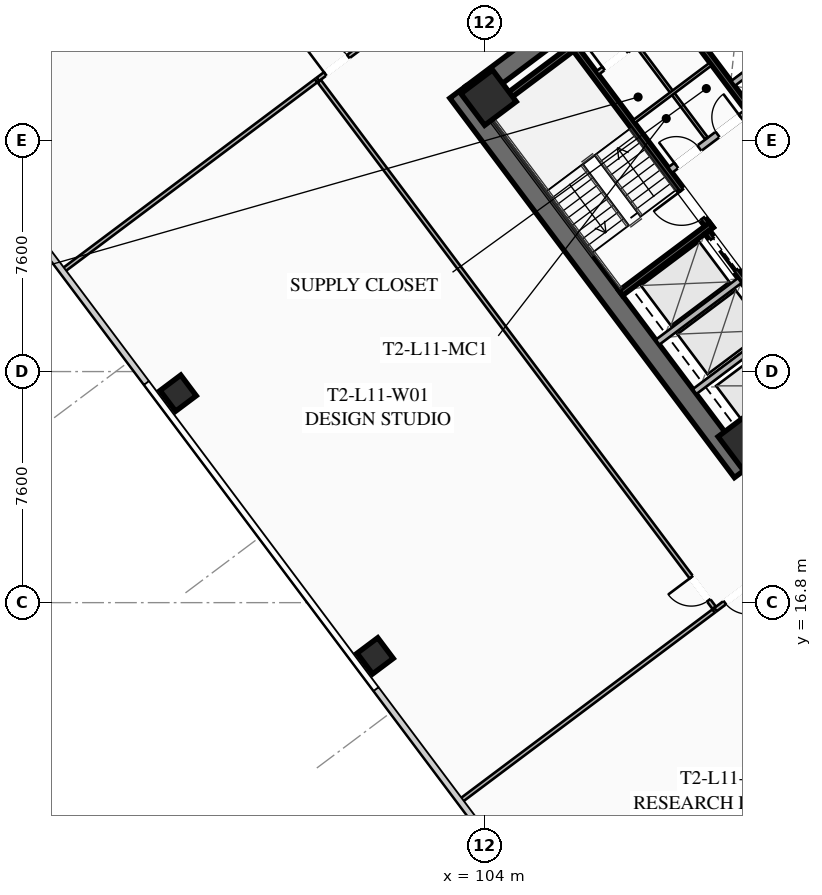
"""IFC4 building model, lengths in metres.
Left out: names, types, materials, properties, quantities, classifications, styles, units other than length and angle.
Written with IfcOpenShell. Run it as: python <this file> out.ifc"""

import sys

from ifc_helpers import new_model, si_unit, direction, frame, frame_2d, origin, origin_2d, place, context, subcontext, project, spatial, rectangle, hollow_rectangle, extrude, element, fill, save


model = new_model("IFC4")
c1 = context("Model", 3, precision=1e-05, world=origin(), true_north=direction((0.0, 1.0)))
c2 = subcontext(c1, "Body", "Model", "MODEL_VIEW")
j1 = project(units=[si_unit("LENGTHUNIT", "METRE"), si_unit("PLANEANGLEUNIT", "RADIAN")], contexts=[c1])
p1 = place(None, origin())
s1 = spatial("IfcSite", under=j1, at=p1, CompositionType="ELEMENT")
p2 = place(p1, origin())
s2 = spatial("IfcBuilding", under=s1, at=p2, CompositionType="ELEMENT")
p3 = place(p2, frame((0.0, 0.0, 45.9)))
s3 = spatial("IfcBuildingStorey", under=s2, at=p3, CompositionType="ELEMENT", Elevation=45.9)
p4 = place(p3, frame((112.476, 21.107, 0.0), z_axis=(0.0, 0.0, 1.0), x_axis=(-0.600005007985, 0.799996243986, 0.0)))
e1 = element("IfcWall", 1, at=p4, inside=s3, PredefinedType="SHEAR", context=c2, shape_type="SweptSolid", body=[
    extrude(rectangle(XDim=15.6, YDim=0.65, at=frame_2d((7.8, 0.0))), origin(), (0.0, 0.0, 1.0), 3.55),
])
p5 = place(p3, frame((124.429, 30.478, 0.0), z_axis=(0.0, 0.0, 1.0), x_axis=(-0.799998028465, -0.600002628705, 0.0)))
e2 = element("IfcWall", 2, at=p5, inside=s3, PredefinedType="SHEAR", context=c2, shape_type="SweptSolid", body=[
    extrude(rectangle(XDim=14.86, YDim=0.65, at=frame_2d((7.43, 0.0))), origin(), (0.0, 0.0, 1.0), 3.55),
])
p6 = place(p5, frame((9.13, 0.0, 0.0)))
e3 = element("IfcOpeningElement", 3, at=p6, cuts=e2, PredefinedType="OPENING", context=c2, shape_type="SweptSolid", body=[
    extrude(rectangle(XDim=1.25, YDim=2.25, at=frame_2d((0.625, 1.125))), frame((0.0, 0.335, 0.0), z_axis=(0.0, -1.0, 0.0), x_axis=(1.0, 0.0, 0.0)), (0.0, 0.0, 1.0), 0.67),
])
p7 = place(p5, frame((4.08, 0.0, 0.0)))
e4 = element("IfcOpeningElement", 4, at=p7, cuts=e2, PredefinedType="OPENING", context=c2, shape_type="SweptSolid", body=[
    extrude(rectangle(XDim=1.25, YDim=2.25, at=frame_2d((0.625, 1.125))), frame((0.0, 0.335, 0.0), z_axis=(0.0, -1.0, 0.0), x_axis=(1.0, 0.0, 0.0)), (0.0, 0.0, 1.0), 0.67),
])
p8 = place(p3, frame((103.571, 33.522, 0.0), z_axis=(0.0, 0.0, 1.0), x_axis=(0.799998028465, 0.600002628705, 0.0)))
e5 = element("IfcWall", 5, at=p8, inside=s3, PredefinedType="SHEAR", context=c2, shape_type="SweptSolid", body=[
    extrude(rectangle(XDim=14.86, YDim=0.65, at=frame_2d((7.43, 0.0))), origin(), (0.0, 0.0, 1.0), 3.55),
])
p9 = place(p8, frame((4.48, 0.0, 0.0)))
e6 = element("IfcOpeningElement", 6, at=p9, cuts=e5, PredefinedType="OPENING", context=c2, shape_type="SweptSolid", body=[
    extrude(rectangle(XDim=1.25, YDim=2.25, at=frame_2d((0.625, 1.125))), frame((0.0, 0.335, 0.0), z_axis=(0.0, -1.0, 0.0), x_axis=(1.0, 0.0, 0.0)), (0.0, 0.0, 1.0), 0.67),
])
p10 = place(p8, frame((9.53, 0.0, 0.0)))
e7 = element("IfcOpeningElement", 7, at=p10, cuts=e5, PredefinedType="OPENING", context=c2, shape_type="SweptSolid", body=[
    extrude(rectangle(XDim=1.25, YDim=2.25, at=frame_2d((0.625, 1.125))), frame((0.0, 0.335, 0.0), z_axis=(0.0, -1.0, 0.0), x_axis=(1.0, 0.0, 0.0)), (0.0, 0.0, 1.0), 0.67),
])
for number, where, z_axis, x_axis in (
    (8, (112.59, 22.13, 0.0), (0.0, 0.0, 1.0), (0.8, 0.6, 0.0)),
    (9, (104.13, 33.41, 0.0), (0.0, 0.0, 1.0), (0.8, 0.6, 0.0)),
):
    element("IfcColumn", number, at=place(p3, frame(where, z_axis=z_axis, x_axis=x_axis)), inside=s3, PredefinedType="COLUMN", context=c2, shape_type="SweptSolid", body=[
        extrude(hollow_rectangle(XDim=1.3, YDim=1.3, WallThickness=0.05, at=origin_2d()), origin(), (0.0, 0.0, 1.0), 3.35),
    ])
for number, where, z_axis, x_axis in (
    (10, (93.92, 23.69, 0.0), (0.0, 0.0, 1.0), (0.8, 0.6, 0.0)),
    (11, (100.4, 15.05, 0.0), (0.0, 0.0, 1.0), (0.8, 0.6, 0.0)),
):
    element("IfcColumn", number, at=place(p3, frame(where, z_axis=z_axis, x_axis=x_axis)), inside=s3, PredefinedType="COLUMN", context=c2, shape_type="SweptSolid", body=[
        extrude(hollow_rectangle(XDim=0.85, YDim=0.85, WallThickness=0.035, at=origin_2d()), origin(), (0.0, 0.0, 1.0), 3.35),
    ])
p11 = place(p3, frame((111.44, 29.08, 0.0), z_axis=(0.0, 0.0, 1.0), x_axis=(-0.600009827119, 0.799992629566, 0.0)))
e12 = element("IfcWall", 12, at=p11, inside=s3, PredefinedType="SHEAR", context=c2, shape_type="SweptSolid", body=[
    extrude(rectangle(XDim=7.95, YDim=0.2, at=frame_2d((3.975, 0.0))), origin(), (0.0, 0.0, 1.0), 3.35),
])
p12 = place(p11, frame((0.45, 0.0, 0.0)))
e13 = element("IfcOpeningElement", 13, at=p12, cuts=e12, PredefinedType="OPENING", context=c2, shape_type="SweptSolid", body=[
    extrude(rectangle(XDim=1.15, YDim=2.2, at=frame_2d((0.575, 1.1))), frame((0.0, 0.11, 0.0), z_axis=(0.0, -1.0, 0.0), x_axis=(1.0, 0.0, 0.0)), (0.0, 0.0, 1.0), 0.22),
])
for number, where, z_axis, x_axis in (
    (14, (108.476, 26.982, 0.0), (0.0, 0.0, 1.0), (0.8, 0.6, 0.0)),
    (15, (104.036, 32.902, 0.0), (0.0, 0.0, 1.0), (0.8, 0.6, 0.0)),
):
    element("IfcWall", number, at=place(p3, frame(where, z_axis=z_axis, x_axis=x_axis)), inside=s3, PredefinedType="SHEAR", context=c2, shape_type="SweptSolid", body=[
        extrude(rectangle(XDim=3.73, YDim=0.2, at=frame_2d((1.865, 0.0))), origin(), (0.0, 0.0, 1.0), 3.35),
    ])
p13 = place(p3, frame((117.938, 26.016, 0.0), z_axis=(0.0, 0.0, 1.0), x_axis=(-0.600005463273, 0.799995902516, 0.0)))
e16 = element("IfcWall", 16, at=p13, inside=s3, PredefinedType="SHEAR", context=c2, shape_type="SweptSolid", body=[
    extrude(rectangle(XDim=14.3, YDim=0.2, at=frame_2d((7.15, 0.0))), origin(), (0.0, 0.0, 1.0), 3.35),
])
p14 = place(p3, frame((110.104, 31.028, 0.0), z_axis=(0.0, 0.0, 1.0), x_axis=(0.800018601094, 0.59997519774, 0.0)))
e17 = element("IfcWall", 17, at=p14, inside=s3, PredefinedType="SOLIDWALL", context=c2, shape_type="SweptSolid", body=[
    extrude(rectangle(XDim=3.15, YDim=0.22, at=frame_2d((1.575, 0.0))), origin(), (0.0, 0.0, 1.0), 2.703),
])
p15 = place(p14, frame((0.25, 0.0, 0.0)))
e18 = element("IfcOpeningElement", 18, at=p15, cuts=e17, PredefinedType="OPENING", context=c2, shape_type="SweptSolid", body=[
    extrude(rectangle(XDim=0.95, YDim=2.05, at=frame_2d((0.475, 1.025))), frame((0.0, 0.12, 0.0), z_axis=(0.0, -1.0, 0.0), x_axis=(1.0, 0.0, 0.0)), (0.0, 0.0, 1.0), 0.24),
])
p16 = place(p14, frame((1.95, 0.0, 0.0)))
e19 = element("IfcOpeningElement", 19, at=p16, cuts=e17, PredefinedType="OPENING", context=c2, shape_type="SweptSolid", body=[
    extrude(rectangle(XDim=0.95, YDim=2.05, at=frame_2d((0.475, 1.025))), frame((0.0, 0.12, 0.0), z_axis=(0.0, -1.0, 0.0), x_axis=(1.0, 0.0, 0.0)), (0.0, 0.0, 1.0), 0.24),
])
p17 = place(p3, frame((115.13, 23.91, 0.0), z_axis=(0.0, 0.0, 1.0), x_axis=(-0.599975393228, 0.800018454488, 0.0)))
e20 = element("IfcWall", 20, at=p17, inside=s3, PredefinedType="SHEAR", context=c2, shape_type="SweptSolid", body=[
    extrude(rectangle(XDim=6.35, YDim=0.2, at=frame_2d((3.175, 0.0))), origin(), (0.0, 0.0, 1.0), 3.35),
])
p18 = place(p17, frame((4.775, 0.0, 0.0)))
e21 = element("IfcOpeningElement", 21, at=p18, cuts=e20, PredefinedType="OPENING", context=c2, shape_type="SweptSolid", body=[
    extrude(rectangle(XDim=1.3, YDim=2.25, at=frame_2d((0.65, 1.125))), frame((0.0, 0.11, 0.0), z_axis=(0.0, -1.0, 0.0), x_axis=(1.0, 0.0, 0.0)), (0.0, 0.0, 1.0), 0.22),
])
p19 = place(p17, frame((2.775, 0.0, 0.0)))
e22 = element("IfcOpeningElement", 22, at=p19, cuts=e20, PredefinedType="OPENING", context=c2, shape_type="SweptSolid", body=[
    extrude(rectangle(XDim=1.3, YDim=2.25, at=frame_2d((0.65, 1.125))), frame((0.0, 0.11, 0.0), z_axis=(0.0, -1.0, 0.0), x_axis=(1.0, 0.0, 0.0)), (0.0, 0.0, 1.0), 0.22),
])
p20 = place(p17, frame((0.575, 0.0, 0.0)))
e23 = element("IfcOpeningElement", 23, at=p20, cuts=e20, PredefinedType="OPENING", context=c2, shape_type="SweptSolid", body=[
    extrude(rectangle(XDim=1.3, YDim=2.25, at=frame_2d((0.65, 1.125))), frame((0.0, 0.11, 0.0), z_axis=(0.0, -1.0, 0.0), x_axis=(1.0, 0.0, 0.0)), (0.0, 0.0, 1.0), 0.22),
])
for number, where, z_axis, x_axis in (
    (24, (110.906, 23.742, 0.0), (0.0, 0.0, 1.0), (0.8, 0.6, 0.0)),
    (25, (109.688, 25.366, 0.0), (0.0, 0.0, 1.0), (0.8, 0.6, 0.0)),
):
    element("IfcWall", number, at=place(p3, frame(where, z_axis=z_axis, x_axis=x_axis)), inside=s3, PredefinedType="SOLIDWALL", context=c2, shape_type="SweptSolid", body=[
        extrude(rectangle(XDim=3.38, YDim=0.2, at=frame_2d((1.69, 0.0))), origin(), (0.0, 0.0, 1.0), 3.35),
    ])
p21 = place(p3, frame((107.71, 34.22, 0.0), z_axis=(0.0, 0.0, 1.0), x_axis=(0.799981399002, 0.60002480053, 0.0)))
e26 = element("IfcWall", 26, at=p21, inside=s3, PredefinedType="PARTITIONING", context=c2, shape_type="SweptSolid", body=[
    extrude(rectangle(XDim=3.15, YDim=0.135, at=frame_2d((1.575, 0.0))), origin(), (0.0, 0.0, 1.0), 2.703),
])
p22 = place(p21, frame((0.25, 0.0, 0.0)))
e27 = element("IfcOpeningElement", 27, at=p22, cuts=e26, PredefinedType="OPENING", context=c2, shape_type="SweptSolid", body=[
    extrude(rectangle(XDim=0.95, YDim=2.05, at=frame_2d((0.475, 1.025))), frame((0.0, 0.077, 0.0), z_axis=(0.0, -1.0, 0.0), x_axis=(1.0, 0.0, 0.0)), (0.0, 0.0, 1.0), 0.155),
])
p23 = place(p21, frame((1.95, 0.0, 0.0)))
e28 = element("IfcOpeningElement", 28, at=p23, cuts=e26, PredefinedType="OPENING", context=c2, shape_type="SweptSolid", body=[
    extrude(rectangle(XDim=0.95, YDim=2.05, at=frame_2d((0.475, 1.025))), frame((0.0, 0.077, 0.0), z_axis=(0.0, -1.0, 0.0), x_axis=(1.0, 0.0, 0.0)), (0.0, 0.0, 1.0), 0.155),
])
p24 = place(p3, frame((111.296, 32.072, 0.0), z_axis=(0.0, 0.0, 1.0), x_axis=(-0.59995887973, 0.800030838552, 0.0)))
e29 = element("IfcWall", 29, at=p24, inside=s3, PredefinedType="PARTITIONING", context=c2, shape_type="SweptSolid", body=[
    extrude(rectangle(XDim=3.8, YDim=0.11, at=frame_2d((1.9, 0.0))), origin(), (0.0, 0.0, 1.0), 2.703),
])
p25 = place(p3, frame((108.91, 32.62, 0.0), z_axis=(0.0, 0.0, 1.0), x_axis=(0.800018601094, 0.59997519774, 0.0)))
e30 = element("IfcWall", 30, at=p25, inside=s3, PredefinedType="PARTITIONING", context=c2, shape_type="SweptSolid", body=[
    extrude(rectangle(XDim=3.15, YDim=0.11, at=frame_2d((1.575, 0.0))), origin(), (0.0, 0.0, 1.0), 2.703),
])
p26 = place(p3, frame((115.11, 33.27, 0.0), z_axis=(0.0, 0.0, 1.0), x_axis=(-0.600011488909, 0.79999138319, 0.0)))
e31 = element("IfcWall", 31, at=p26, inside=s3, PredefinedType="SOLIDWALL", context=c2, shape_type="SweptSolid", body=[
    extrude(rectangle(XDim=6.8, YDim=0.2, at=frame_2d((3.4, 0.0))), origin(), (0.0, 0.0, 1.0), 3.35),
])
p27 = place(p3, frame((112.176, 33.882, 0.0), z_axis=(0.0, 0.0, 1.0), x_axis=(0.8, 0.6, 0.0)))
e32 = element("IfcWall", 32, at=p27, inside=s3, PredefinedType="SOLIDWALL", context=c2, shape_type="SweptSolid", body=[
    extrude(rectangle(XDim=1.88, YDim=0.2, at=frame_2d((0.94, 0.0))), origin(), (0.0, 0.0, 1.0), 3.35),
])
p28 = place(p3, frame((98.516, 34.012, 0.0), z_axis=(0.0, 0.0, 1.0), x_axis=(0.799998035726, 0.600002619023, 0.0)))
e33 = element("IfcWall", 33, at=p28, inside=s3, PredefinedType="PARTITIONING", context=c2, shape_type="SweptSolid", body=[
    extrude(rectangle(XDim=29.83, YDim=0.135, at=frame_2d((14.915, 0.0))), origin(), (0.0, 0.0, 1.0), 2.703),
])
p29 = place(p28, frame((0.3, 0.0, 0.0)))
e34 = element("IfcOpeningElement", 34, at=p29, cuts=e33, PredefinedType="OPENING", context=c2, shape_type="SweptSolid", body=[
    extrude(rectangle(XDim=0.95, YDim=2.05, at=frame_2d((0.475, 1.025))), frame((0.0, 0.077, 0.0), z_axis=(0.0, -1.0, 0.0), x_axis=(1.0, 0.0, 0.0)), (0.0, 0.0, 1.0), 0.155),
])
p30 = place(p28, frame((10.835, 0.0, 0.0)))
e35 = element("IfcOpeningElement", 35, at=p30, cuts=e33, PredefinedType="OPENING", context=c2, shape_type="SweptSolid", body=[
    extrude(rectangle(XDim=0.95, YDim=2.05, at=frame_2d((0.475, 1.025))), frame((0.0, 0.077, 0.0), z_axis=(0.0, -1.0, 0.0), x_axis=(1.0, 0.0, 0.0)), (0.0, 0.0, 1.0), 0.155),
])
p31 = place(p28, frame((14.879, 0.0, 0.0)))
e36 = element("IfcOpeningElement", 36, at=p31, cuts=e33, PredefinedType="OPENING", context=c2, shape_type="SweptSolid", body=[
    extrude(rectangle(XDim=0.95, YDim=2.05, at=frame_2d((0.475, 1.025))), frame((0.0, 0.077, 0.0), z_axis=(0.0, -1.0, 0.0), x_axis=(1.0, 0.0, 0.0)), (0.0, 0.0, 1.0), 0.155),
])
p32 = place(p28, frame((28.58, 0.0, 0.0)))
e37 = element("IfcOpeningElement", 37, at=p32, cuts=e33, PredefinedType="OPENING", context=c2, shape_type="SweptSolid", body=[
    extrude(rectangle(XDim=0.95, YDim=2.05, at=frame_2d((0.475, 1.025))), frame((0.0, 0.077, 0.0), z_axis=(0.0, -1.0, 0.0), x_axis=(1.0, 0.0, 0.0)), (0.0, 0.0, 1.0), 0.155),
])
p33 = place(p3, frame((135.46, 34.47, 0.0), z_axis=(0.0, 0.0, 1.0), x_axis=(-0.800000982127, -0.599998690494, 0.0)))
e38 = element("IfcWall", 38, at=p33, inside=s3, PredefinedType="PARTITIONING", context=c2, shape_type="SweptSolid", body=[
    extrude(rectangle(XDim=29.83, YDim=0.135, at=frame_2d((14.915, 0.0))), origin(), (0.0, 0.0, 1.0), 2.703),
])
p34 = place(p33, frame((28.5, 0.0, 0.0)))
e39 = element("IfcOpeningElement", 39, at=p34, cuts=e38, PredefinedType="OPENING", context=c2, shape_type="SweptSolid", body=[
    extrude(rectangle(XDim=0.95, YDim=2.05, at=frame_2d((0.475, 1.025))), frame((0.0, 0.077, 0.0), z_axis=(0.0, -1.0, 0.0), x_axis=(1.0, 0.0, 0.0)), (0.0, 0.0, 1.0), 0.155),
])
p35 = place(p33, frame((17.892, 0.0, 0.0)))
e40 = element("IfcOpeningElement", 40, at=p35, cuts=e38, PredefinedType="OPENING", context=c2, shape_type="SweptSolid", body=[
    extrude(rectangle(XDim=0.95, YDim=2.05, at=frame_2d((0.475, 1.025))), frame((0.0, 0.077, 0.0), z_axis=(0.0, -1.0, 0.0), x_axis=(1.0, 0.0, 0.0)), (0.0, 0.0, 1.0), 0.155),
])
p36 = place(p33, frame((0.38, 0.0, 0.0)))
e41 = element("IfcOpeningElement", 41, at=p36, cuts=e38, PredefinedType="OPENING", context=c2, shape_type="SweptSolid", body=[
    extrude(rectangle(XDim=0.95, YDim=2.05, at=frame_2d((0.475, 1.025))), frame((0.0, 0.077, 0.0), z_axis=(0.0, -1.0, 0.0), x_axis=(1.0, 0.0, 0.0)), (0.0, 0.0, 1.0), 0.155),
])
p37 = place(p3, frame((111.548, 16.636, 0.0), z_axis=(0.0, 0.0, 1.0), x_axis=(-0.600003610192, 0.799997292343, 0.0)))
e42 = element("IfcWall", 42, at=p37, inside=s3, PredefinedType="PARTITIONING", context=c2, shape_type="SweptSolid", body=[
    extrude(rectangle(XDim=21.64, YDim=0.135, at=frame_2d((10.82, 0.0))), origin(), (0.0, 0.0, 1.0), 2.703),
])
p38 = place(p37, frame((0.3, 0.0, 0.0)))
e43 = element("IfcOpeningElement", 43, at=p38, cuts=e42, PredefinedType="OPENING", context=c2, shape_type="SweptSolid", body=[
    extrude(rectangle(XDim=0.95, YDim=2.05, at=frame_2d((0.475, 1.025))), frame((0.0, 0.077, 0.0), z_axis=(0.0, -1.0, 0.0), x_axis=(1.0, 0.0, 0.0)), (0.0, 0.0, 1.0), 0.155),
])
p39 = place(p3, frame((98.452, 33.964, 0.0), z_axis=(0.0, 0.0, 1.0), x_axis=(-0.799988753532, -0.600014994998, 0.0)))
e44 = element("IfcWall", 44, at=p39, inside=s3, PredefinedType="PARTITIONING", context=c2, shape_type="SweptSolid", body=[
    extrude(rectangle(XDim=10.42, YDim=0.135, at=frame_2d((5.21, 0.0))), origin(), (0.0, 0.0, 1.0), 2.703),
])
p40 = place(p3, frame((103.196, 10.272, 0.0), z_axis=(0.0, 0.0, 1.0), x_axis=(0.8, 0.6, 0.0)))
e45 = element("IfcWall", 45, at=p40, inside=s3, PredefinedType="PARTITIONING", context=c2, shape_type="SweptSolid", body=[
    extrude(rectangle(XDim=10.42, YDim=0.135, at=frame_2d((5.21, 0.0))), origin(), (0.0, 0.0, 1.0), 2.703),
])
p41 = place(p12, origin())
e46 = element("IfcDoor", 46, at=p41, inside=s3, OperationType="SINGLE_SWING_RIGHT", PredefinedType="DOOR", context=c2, shape_type="SweptSolid", body=[
    extrude(rectangle(XDim=1.15, YDim=2.2, at=frame_2d((0.575, 1.1))), frame((0.0, 0.025, 0.0), z_axis=(0.0, -1.0, 0.0), x_axis=(1.0, 0.0, 0.0)), (0.0, 0.0, 1.0), 0.05),
])
fill(e13, e46)
p42 = place(p22, origin())
e47 = element("IfcDoor", 47, at=p42, inside=s3, OperationType="SINGLE_SWING_LEFT", PredefinedType="DOOR", context=c2, shape_type="SweptSolid", body=[
    extrude(rectangle(XDim=0.95, YDim=2.05, at=frame_2d((0.475, 1.025))), frame((0.0, 0.025, 0.0), z_axis=(0.0, -1.0, 0.0), x_axis=(1.0, 0.0, 0.0)), (0.0, 0.0, 1.0), 0.05),
])
fill(e27, e47)
p43 = place(p15, origin())
e48 = element("IfcDoor", 48, at=p43, inside=s3, OperationType="SINGLE_SWING_LEFT", PredefinedType="DOOR", context=c2, shape_type="SweptSolid", body=[
    extrude(rectangle(XDim=0.95, YDim=2.05, at=frame_2d((0.475, 1.025))), frame((0.0, 0.025, 0.0), z_axis=(0.0, -1.0, 0.0), x_axis=(1.0, 0.0, 0.0)), (0.0, 0.0, 1.0), 0.05),
])
fill(e18, e48)
p44 = place(p16, origin())
e49 = element("IfcDoor", 49, at=p44, inside=s3, OperationType="SINGLE_SWING_RIGHT", PredefinedType="DOOR", context=c2, shape_type="SweptSolid", body=[
    extrude(rectangle(XDim=0.95, YDim=2.05, at=frame_2d((0.475, 1.025))), frame((0.0, 0.025, 0.0), z_axis=(0.0, -1.0, 0.0), x_axis=(1.0, 0.0, 0.0)), (0.0, 0.0, 1.0), 0.05),
])
fill(e19, e49)
p45 = place(p29, origin())
e50 = element("IfcDoor", 50, at=p45, inside=s3, OperationType="SINGLE_SWING_LEFT", PredefinedType="DOOR", context=c2, shape_type="SweptSolid", body=[
    extrude(rectangle(XDim=0.95, YDim=2.05, at=frame_2d((0.475, 1.025))), frame((0.0, 0.025, 0.0), z_axis=(0.0, -1.0, 0.0), x_axis=(1.0, 0.0, 0.0)), (0.0, 0.0, 1.0), 0.05),
])
fill(e34, e50)
p46 = place(p34, origin())
e51 = element("IfcDoor", 51, at=p46, inside=s3, OperationType="SINGLE_SWING_LEFT", PredefinedType="DOOR", context=c2, shape_type="SweptSolid", body=[
    extrude(rectangle(XDim=0.95, YDim=2.05, at=frame_2d((0.475, 1.025))), frame((0.0, 0.025, 0.0), z_axis=(0.0, -1.0, 0.0), x_axis=(1.0, 0.0, 0.0)), (0.0, 0.0, 1.0), 0.05),
])
fill(e39, e51)
p47 = place(p38, origin())
e52 = element("IfcDoor", 52, at=p47, inside=s3, OperationType="SINGLE_SWING_RIGHT", PredefinedType="DOOR", context=c2, shape_type="SweptSolid", body=[
    extrude(rectangle(XDim=0.95, YDim=2.05, at=frame_2d((0.475, 1.025))), frame((0.0, 0.025, 0.0), z_axis=(0.0, -1.0, 0.0), x_axis=(1.0, 0.0, 0.0)), (0.0, 0.0, 1.0), 0.05),
])
fill(e43, e52)
p48 = place(p18, origin())
e53 = element("IfcDoor", 53, at=p48, inside=s3, OperationType="SLIDING_TO_LEFT", PredefinedType="DOOR", context=c2, shape_type="SweptSolid", body=[
    extrude(rectangle(XDim=1.3, YDim=2.25, at=frame_2d((0.65, 1.125))), frame((0.0, 0.025, 0.0), z_axis=(0.0, -1.0, 0.0), x_axis=(1.0, 0.0, 0.0)), (0.0, 0.0, 1.0), 0.05),
])
fill(e21, e53)
save(model, sys.argv[1])
